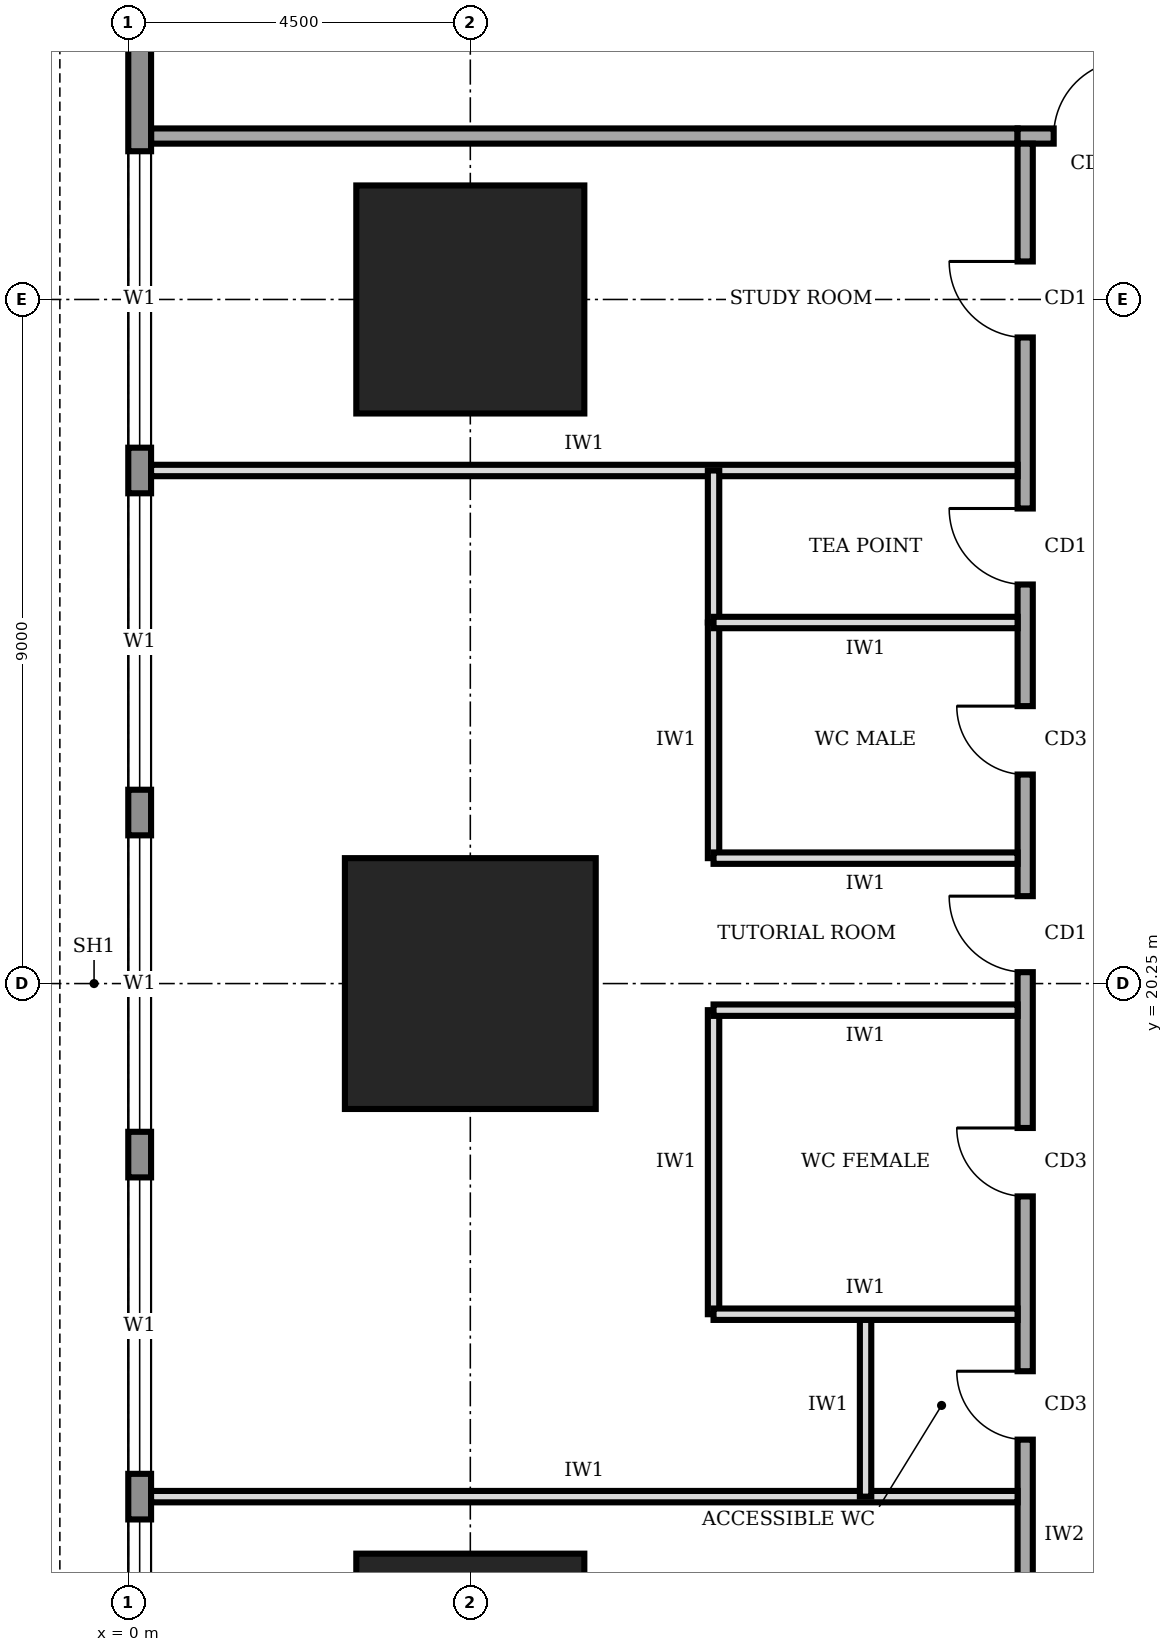
"""IFC4 building model, lengths in metres.
Left out: names, types, materials, properties, quantities, classifications, styles, units other than length and angle.
Written with IfcOpenShell. Run it as: python <this file> out.ifc"""

import sys

from ifc_helpers import new_model, si_unit, direction, frame, frame_2d, origin, origin_2d, place, context, subcontext, project, spatial, rectangle, extrude, element, fill, save


model = new_model("IFC4")
c1 = context("Model", 3, precision=1e-05, world=origin(), true_north=direction((0.0, 1.0)))
c2 = subcontext(c1, "Body", "Model", "MODEL_VIEW")
j1 = project(units=[si_unit("LENGTHUNIT", "METRE"), si_unit("PLANEANGLEUNIT", "RADIAN")], contexts=[c1])
p1 = place(None, origin())
s1 = spatial("IfcSite", under=j1, at=p1, CompositionType="ELEMENT")
p2 = place(p1, origin())
s2 = spatial("IfcBuilding", under=s1, at=p2, CompositionType="ELEMENT")
p3 = place(p2, frame((0.0, 0.0, 41.0)))
s3 = spatial("IfcBuildingStorey", under=s2, at=p3, CompositionType="ELEMENT", Elevation=41.0)
p4 = place(p3, frame((4.5, 11.25, 0.0), z_axis=(0.0, 0.0, 1.0), x_axis=(1.0, 0.0, 0.0)))
e1 = element("IfcColumn", 1, at=p4, inside=s3, PredefinedType="COLUMN", context=c2, shape_type="SweptSolid", body=[
    extrude(rectangle(XDim=3.0, YDim=3.0, at=origin_2d()), origin(), (0.0, 0.0, 1.0), 4.0),
])
p5 = place(p3, frame((4.5, 20.25, 0.0), z_axis=(0.0, 0.0, 1.0), x_axis=(1.0, 0.0, 0.0)))
e2 = element("IfcColumn", 2, at=p5, inside=s3, PredefinedType="COLUMN", context=c2, shape_type="SweptSolid", body=[
    extrude(rectangle(XDim=3.3, YDim=3.3, at=origin_2d()), origin(), (0.0, 0.0, 1.0), 4.0),
])
p6 = place(p3, frame((4.5, 29.25, 0.0), z_axis=(0.0, 0.0, 1.0), x_axis=(1.0, 0.0, 0.0)))
e3 = element("IfcColumn", 3, at=p6, inside=s3, PredefinedType="COLUMN", context=c2, shape_type="SweptSolid", body=[
    extrude(rectangle(XDim=3.0, YDim=3.0, at=origin_2d()), origin(), (0.0, 0.0, 1.0), 4.0),
])
p7 = place(p3, frame((0.15, 35.98, 0.0), z_axis=(0.0, 0.0, 1.0), x_axis=(0.0, -1.0, 0.0)))
e4 = element("IfcWall", 4, at=p7, inside=s3, PredefinedType="STANDARD", context=c2, shape_type="SweptSolid", body=[
    extrude(rectangle(XDim=31.46, YDim=0.3, at=frame_2d((15.73, 0.0))), origin(), (0.0, 0.0, 1.0), 3.75),
])
p8 = place(p7, frame((27.28, 0.0, 0.9)))
e5 = element("IfcOpeningElement", 5, at=p8, cuts=e4, PredefinedType="OPENING", context=c2, shape_type="SweptSolid", body=[
    extrude(rectangle(XDim=3.9, YDim=2.2, at=frame_2d((1.95, 1.1))), frame((0.0, 0.16, 0.0), z_axis=(0.0, -1.0, 0.0), x_axis=(1.0, 0.0, 0.0)), (0.0, 0.0, 1.0), 0.32),
])
p9 = place(p7, frame((22.78, 0.0, 0.9)))
e6 = element("IfcOpeningElement", 6, at=p9, cuts=e4, PredefinedType="OPENING", context=c2, shape_type="SweptSolid", body=[
    extrude(rectangle(XDim=3.9, YDim=2.2, at=frame_2d((1.95, 1.1))), frame((0.0, 0.16, 0.0), z_axis=(0.0, -1.0, 0.0), x_axis=(1.0, 0.0, 0.0)), (0.0, 0.0, 1.0), 0.32),
])
p10 = place(p7, frame((18.28, 0.0, 0.9)))
e7 = element("IfcOpeningElement", 7, at=p10, cuts=e4, PredefinedType="OPENING", context=c2, shape_type="SweptSolid", body=[
    extrude(rectangle(XDim=3.9, YDim=2.2, at=frame_2d((1.95, 1.1))), frame((0.0, 0.16, 0.0), z_axis=(0.0, -1.0, 0.0), x_axis=(1.0, 0.0, 0.0)), (0.0, 0.0, 1.0), 0.32),
])
p11 = place(p7, frame((13.78, 0.0, 0.9)))
e8 = element("IfcOpeningElement", 8, at=p11, cuts=e4, PredefinedType="OPENING", context=c2, shape_type="SweptSolid", body=[
    extrude(rectangle(XDim=3.9, YDim=2.2, at=frame_2d((1.95, 1.1))), frame((0.0, 0.16, 0.0), z_axis=(0.0, -1.0, 0.0), x_axis=(1.0, 0.0, 0.0)), (0.0, 0.0, 1.0), 0.32),
])
p12 = place(p7, frame((9.28, 0.0, 0.9)))
e9 = element("IfcOpeningElement", 9, at=p12, cuts=e4, PredefinedType="OPENING", context=c2, shape_type="SweptSolid", body=[
    extrude(rectangle(XDim=3.9, YDim=2.2, at=frame_2d((1.95, 1.1))), frame((0.0, 0.16, 0.0), z_axis=(0.0, -1.0, 0.0), x_axis=(1.0, 0.0, 0.0)), (0.0, 0.0, 1.0), 0.32),
])
p13 = place(p7, frame((4.78, 0.0, 0.9)))
e10 = element("IfcOpeningElement", 10, at=p13, cuts=e4, PredefinedType="OPENING", context=c2, shape_type="SweptSolid", body=[
    extrude(rectangle(XDim=3.9, YDim=2.2, at=frame_2d((1.95, 1.1))), frame((0.0, 0.16, 0.0), z_axis=(0.0, -1.0, 0.0), x_axis=(1.0, 0.0, 0.0)), (0.0, 0.0, 1.0), 0.32),
])
p14 = place(p3, frame((30.1, 31.4, 0.0), z_axis=(0.0, 0.0, 1.0), x_axis=(-1.0, 0.0, 0.0)))
e11 = element("IfcWall", 11, at=p14, inside=s3, PredefinedType="SOLIDWALL", context=c2, shape_type="SweptSolid", body=[
    extrude(rectangle(XDim=18.4, YDim=0.2, at=frame_2d((9.2, 0.0))), origin(), (0.0, 0.0, 1.0), 3.75),
])
p15 = place(p14, frame((16.925, 0.0, 0.0)))
e12 = element("IfcOpeningElement", 12, at=p15, cuts=e11, PredefinedType="OPENING", context=c2, shape_type="SweptSolid", body=[
    extrude(rectangle(XDim=1.0, YDim=2.1, at=frame_2d((0.5, 1.05))), frame((0.0, 0.11, 0.0), z_axis=(0.0, -1.0, 0.0), x_axis=(1.0, 0.0, 0.0)), (0.0, 0.0, 1.0), 0.22),
])
p16 = place(p14, frame((13.85, 0.0, 0.0)))
e13 = element("IfcOpeningElement", 13, at=p16, cuts=e11, PredefinedType="OPENING", context=c2, shape_type="SweptSolid", body=[
    extrude(rectangle(XDim=1.0, YDim=2.1, at=frame_2d((0.5, 1.05))), frame((0.0, 0.11, 0.0), z_axis=(0.0, -1.0, 0.0), x_axis=(1.0, 0.0, 0.0)), (0.0, 0.0, 1.0), 0.22),
])
p17 = place(p14, frame((7.1, 0.0, 0.0)))
e14 = element("IfcOpeningElement", 14, at=p17, cuts=e11, PredefinedType="OPENING", context=c2, shape_type="SweptSolid", body=[
    extrude(rectangle(XDim=1.0, YDim=2.1, at=frame_2d((0.5, 1.05))), frame((0.0, 0.11, 0.0), z_axis=(0.0, -1.0, 0.0), x_axis=(1.0, 0.0, 0.0)), (0.0, 0.0, 1.0), 0.22),
])
p18 = place(p14, frame((0.55, 0.0, 0.0)))
e15 = element("IfcOpeningElement", 15, at=p18, cuts=e11, PredefinedType="OPENING", context=c2, shape_type="SweptSolid", body=[
    extrude(rectangle(XDim=1.8, YDim=2.1, at=frame_2d((0.9, 1.05))), frame((0.0, 0.11, 0.0), z_axis=(0.0, -1.0, 0.0), x_axis=(1.0, 0.0, 0.0)), (0.0, 0.0, 1.0), 0.22),
])
p19 = place(p3, frame((11.8, 31.3, 0.0), z_axis=(0.0, 0.0, 1.0), x_axis=(0.0, -1.0, 0.0)))
e16 = element("IfcWall", 16, at=p19, inside=s3, PredefinedType="SOLIDWALL", context=c2, shape_type="SweptSolid", body=[
    extrude(rectangle(XDim=22.3, YDim=0.2, at=frame_2d((11.15, 0.0))), origin(), (0.0, 0.0, 1.0), 3.75),
])
p20 = place(p19, frame((19.55, 0.0, 0.0)))
e17 = element("IfcOpeningElement", 17, at=p20, cuts=e16, PredefinedType="OPENING", context=c2, shape_type="SweptSolid", body=[
    extrude(rectangle(XDim=1.0, YDim=2.1, at=frame_2d((0.5, 1.05))), frame((0.0, 0.11, 0.0), z_axis=(0.0, -1.0, 0.0), x_axis=(1.0, 0.0, 0.0)), (0.0, 0.0, 1.0), 0.22),
])
p21 = place(p19, frame((16.15, 0.0, 0.0)))
e18 = element("IfcOpeningElement", 18, at=p21, cuts=e16, PredefinedType="OPENING", context=c2, shape_type="SweptSolid", body=[
    extrude(rectangle(XDim=0.9, YDim=2.1, at=frame_2d((0.45, 1.05))), frame((0.0, 0.11, 0.0), z_axis=(0.0, -1.0, 0.0), x_axis=(1.0, 0.0, 0.0)), (0.0, 0.0, 1.0), 0.22),
])
p22 = place(p19, frame((12.95, 0.0, 0.0)))
e19 = element("IfcOpeningElement", 19, at=p22, cuts=e16, PredefinedType="OPENING", context=c2, shape_type="SweptSolid", body=[
    extrude(rectangle(XDim=0.9, YDim=2.1, at=frame_2d((0.45, 1.05))), frame((0.0, 0.11, 0.0), z_axis=(0.0, -1.0, 0.0), x_axis=(1.0, 0.0, 0.0)), (0.0, 0.0, 1.0), 0.22),
])
p23 = place(p19, frame((7.4, 0.0, 0.0)))
e20 = element("IfcOpeningElement", 20, at=p23, cuts=e16, PredefinedType="OPENING", context=c2, shape_type="SweptSolid", body=[
    extrude(rectangle(XDim=0.9, YDim=2.1, at=frame_2d((0.45, 1.05))), frame((0.0, 0.11, 0.0), z_axis=(0.0, -1.0, 0.0), x_axis=(1.0, 0.0, 0.0)), (0.0, 0.0, 1.0), 0.22),
])
p24 = place(p19, frame((4.8, 0.0, 0.0)))
e21 = element("IfcOpeningElement", 21, at=p24, cuts=e16, PredefinedType="OPENING", context=c2, shape_type="SweptSolid", body=[
    extrude(rectangle(XDim=1.0, YDim=2.1, at=frame_2d((0.5, 1.05))), frame((0.0, 0.11, 0.0), z_axis=(0.0, -1.0, 0.0), x_axis=(1.0, 0.0, 0.0)), (0.0, 0.0, 1.0), 0.22),
])
p25 = place(p19, frame((9.9, 0.0, 0.0)))
e22 = element("IfcOpeningElement", 22, at=p25, cuts=e16, PredefinedType="OPENING", context=c2, shape_type="SweptSolid", body=[
    extrude(rectangle(XDim=1.0, YDim=2.1, at=frame_2d((0.5, 1.05))), frame((0.0, 0.11, 0.0), z_axis=(0.0, -1.0, 0.0), x_axis=(1.0, 0.0, 0.0)), (0.0, 0.0, 1.0), 0.22),
])
p26 = place(p19, frame((1.55, 0.0, 0.0)))
e23 = element("IfcOpeningElement", 23, at=p26, cuts=e16, PredefinedType="OPENING", context=c2, shape_type="SweptSolid", body=[
    extrude(rectangle(XDim=1.0, YDim=2.1, at=frame_2d((0.5, 1.05))), frame((0.0, 0.11, 0.0), z_axis=(0.0, -1.0, 0.0), x_axis=(1.0, 0.0, 0.0)), (0.0, 0.0, 1.0), 0.22),
])
p27 = place(p3, frame((0.3, 31.4, 0.0), z_axis=(0.0, 0.0, 1.0), x_axis=(1.0, 0.0, 0.0)))
e24 = element("IfcWall", 24, at=p27, inside=s3, PredefinedType="SOLIDWALL", context=c2, shape_type="SweptSolid", body=[
    extrude(rectangle(XDim=11.4, YDim=0.2, at=frame_2d((5.7, 0.0))), origin(), (0.0, 0.0, 1.0), 3.75),
])
for number, where, z_axis, x_axis in (
    (25, (0.3, 13.5, 0.0), (0.0, 0.0, 1.0), (1.0, 0.0, 0.0)),
    (26, (0.3, 27.0, 0.0), (0.0, 0.0, 1.0), (1.0, 0.0, 0.0)),
):
    element("IfcWall", number, at=place(p3, frame(where, z_axis=z_axis, x_axis=x_axis)), inside=s3, PredefinedType="PARTITIONING", context=c2, shape_type="SweptSolid", body=[
        extrude(rectangle(XDim=11.4, YDim=0.15, at=frame_2d((5.7, 0.0))), origin(), (0.0, 0.0, 1.0), 3.75),
    ])
p28 = place(p3, frame((11.7, 15.9, 0.0), z_axis=(0.0, 0.0, 1.0), x_axis=(-1.0, 0.0, 0.0)))
e27 = element("IfcWall", 27, at=p28, inside=s3, PredefinedType="PARTITIONING", context=c2, shape_type="SweptSolid", body=[
    extrude(rectangle(XDim=4.0, YDim=0.15, at=frame_2d((2.0, 0.0))), origin(), (0.0, 0.0, 1.0), 3.75),
])
p29 = place(p3, frame((11.7, 19.9, 0.0), z_axis=(0.0, 0.0, 1.0), x_axis=(-1.0, 0.0, 0.0)))
e28 = element("IfcWall", 28, at=p29, inside=s3, PredefinedType="PARTITIONING", context=c2, shape_type="SweptSolid", body=[
    extrude(rectangle(XDim=4.0, YDim=0.15, at=frame_2d((2.0, 0.0))), origin(), (0.0, 0.0, 1.0), 2.85),
])
for number, where, z_axis, x_axis in (
    (29, (11.7, 21.9, 0.0), (0.0, 0.0, 1.0), (-1.0, 0.0, 0.0)),
    (30, (11.7, 25.0, 0.0), (0.0, 0.0, 1.0), (-1.0, 0.0, 0.0)),
):
    element("IfcWall", number, at=place(p3, frame(where, z_axis=z_axis, x_axis=x_axis)), inside=s3, PredefinedType="PARTITIONING", context=c2, shape_type="SweptSolid", body=[
        extrude(rectangle(XDim=4.0, YDim=0.15, at=frame_2d((2.0, 0.0))), origin(), (0.0, 0.0, 1.0), 3.75),
    ])
p30 = place(p3, frame((9.7, 13.5, 0.0), z_axis=(0.0, 0.0, 1.0), x_axis=(0.0, 1.0, 0.0)))
e31 = element("IfcWall", 31, at=p30, inside=s3, PredefinedType="PARTITIONING", context=c2, shape_type="SweptSolid", body=[
    extrude(rectangle(XDim=2.4, YDim=0.15, at=frame_2d((1.2, 0.0))), origin(), (0.0, 0.0, 1.0), 3.75),
])
p31 = place(p3, frame((7.7, 15.9, 0.0), z_axis=(0.0, 0.0, 1.0), x_axis=(0.0, 1.0, 0.0)))
e32 = element("IfcWall", 32, at=p31, inside=s3, PredefinedType="PARTITIONING", context=c2, shape_type="SweptSolid", body=[
    extrude(rectangle(XDim=4.0, YDim=0.15, at=frame_2d((2.0, 0.0))), origin(), (0.0, 0.0, 1.0), 3.75),
])
p32 = place(p3, frame((7.7, 21.9, 0.0), z_axis=(0.0, 0.0, 1.0), x_axis=(0.0, 1.0, 0.0)))
e33 = element("IfcWall", 33, at=p32, inside=s3, PredefinedType="PARTITIONING", context=c2, shape_type="SweptSolid", body=[
    extrude(rectangle(XDim=3.1, YDim=0.15, at=frame_2d((1.55, 0.0))), origin(), (0.0, 0.0, 1.0), 3.75),
])
p33 = place(p3, frame((7.7, 25.0, 0.0), z_axis=(0.0, 0.0, 1.0), x_axis=(0.0, 1.0, 0.0)))
e34 = element("IfcWall", 34, at=p33, inside=s3, PredefinedType="PARTITIONING", context=c2, shape_type="SweptSolid", body=[
    extrude(rectangle(XDim=2.0, YDim=0.15, at=frame_2d((1.0, 0.0))), origin(), (0.0, 0.0, 1.0), 3.75),
])
p34 = place(p9, origin())
e35 = element("IfcWindow", 35, at=p34, inside=s3, PartitioningType="SINGLE_PANEL", PredefinedType="WINDOW", context=c2, shape_type="SweptSolid", body=[
    extrude(rectangle(XDim=3.9, YDim=2.2, at=frame_2d((1.95, 1.1))), frame((0.0, 0.03, 0.0), z_axis=(0.0, -1.0, 0.0), x_axis=(1.0, 0.0, 0.0)), (0.0, 0.0, 1.0), 0.06),
])
fill(e6, e35)
p35 = place(p10, origin())
e36 = element("IfcWindow", 36, at=p35, inside=s3, PartitioningType="SINGLE_PANEL", PredefinedType="WINDOW", context=c2, shape_type="SweptSolid", body=[
    extrude(rectangle(XDim=3.9, YDim=2.2, at=frame_2d((1.95, 1.1))), frame((0.0, 0.03, 0.0), z_axis=(0.0, -1.0, 0.0), x_axis=(1.0, 0.0, 0.0)), (0.0, 0.0, 1.0), 0.06),
])
fill(e7, e36)
p36 = place(p11, origin())
e37 = element("IfcWindow", 37, at=p36, inside=s3, PartitioningType="SINGLE_PANEL", PredefinedType="WINDOW", context=c2, shape_type="SweptSolid", body=[
    extrude(rectangle(XDim=3.9, YDim=2.2, at=frame_2d((1.95, 1.1))), frame((0.0, 0.03, 0.0), z_axis=(0.0, -1.0, 0.0), x_axis=(1.0, 0.0, 0.0)), (0.0, 0.0, 1.0), 0.06),
])
fill(e8, e37)
p37 = place(p12, origin())
e38 = element("IfcWindow", 38, at=p37, inside=s3, PartitioningType="SINGLE_PANEL", PredefinedType="WINDOW", context=c2, shape_type="SweptSolid", body=[
    extrude(rectangle(XDim=3.9, YDim=2.2, at=frame_2d((1.95, 1.1))), frame((0.0, 0.03, 0.0), z_axis=(0.0, -1.0, 0.0), x_axis=(1.0, 0.0, 0.0)), (0.0, 0.0, 1.0), 0.06),
])
fill(e9, e38)
p38 = place(p13, origin())
e39 = element("IfcWindow", 39, at=p38, inside=s3, PartitioningType="SINGLE_PANEL", PredefinedType="WINDOW", context=c2, shape_type="SweptSolid", body=[
    extrude(rectangle(XDim=3.9, YDim=2.2, at=frame_2d((1.95, 1.1))), frame((0.0, 0.03, 0.0), z_axis=(0.0, -1.0, 0.0), x_axis=(1.0, 0.0, 0.0)), (0.0, 0.0, 1.0), 0.06),
])
fill(e10, e39)
p39 = place(p15, frame((1.0, 0.0, 0.0), z_axis=(0.0, 0.0, 1.0), x_axis=(-1.0, 0.0, 0.0)))
e40 = element("IfcDoor", 40, at=p39, inside=s3, OperationType="SINGLE_SWING_RIGHT", PredefinedType="DOOR", context=c2, shape_type="SweptSolid", body=[
    extrude(rectangle(XDim=1.0, YDim=2.1, at=frame_2d((0.5, 1.05))), frame((0.0, 0.025, 0.0), z_axis=(0.0, -1.0, 0.0), x_axis=(1.0, 0.0, 0.0)), (0.0, 0.0, 1.0), 0.05),
])
fill(e12, e40)
p40 = place(p21, frame((0.9, 0.0, 0.0), z_axis=(0.0, 0.0, 1.0), x_axis=(-1.0, 0.0, 0.0)))
e41 = element("IfcDoor", 41, at=p40, inside=s3, OperationType="SINGLE_SWING_RIGHT", PredefinedType="DOOR", context=c2, shape_type="SweptSolid", body=[
    extrude(rectangle(XDim=0.9, YDim=2.1, at=frame_2d((0.45, 1.05))), frame((0.0, 0.025, 0.0), z_axis=(0.0, -1.0, 0.0), x_axis=(1.0, 0.0, 0.0)), (0.0, 0.0, 1.0), 0.05),
])
fill(e18, e41)
p41 = place(p22, frame((0.9, 0.0, 0.0), z_axis=(0.0, 0.0, 1.0), x_axis=(-1.0, 0.0, 0.0)))
e42 = element("IfcDoor", 42, at=p41, inside=s3, OperationType="SINGLE_SWING_RIGHT", PredefinedType="DOOR", context=c2, shape_type="SweptSolid", body=[
    extrude(rectangle(XDim=0.9, YDim=2.1, at=frame_2d((0.45, 1.05))), frame((0.0, 0.025, 0.0), z_axis=(0.0, -1.0, 0.0), x_axis=(1.0, 0.0, 0.0)), (0.0, 0.0, 1.0), 0.05),
])
fill(e19, e42)
p42 = place(p23, frame((0.9, 0.0, 0.0), z_axis=(0.0, 0.0, 1.0), x_axis=(-1.0, 0.0, 0.0)))
e43 = element("IfcDoor", 43, at=p42, inside=s3, OperationType="SINGLE_SWING_RIGHT", PredefinedType="DOOR", context=c2, shape_type="SweptSolid", body=[
    extrude(rectangle(XDim=0.9, YDim=2.1, at=frame_2d((0.45, 1.05))), frame((0.0, 0.025, 0.0), z_axis=(0.0, -1.0, 0.0), x_axis=(1.0, 0.0, 0.0)), (0.0, 0.0, 1.0), 0.05),
])
fill(e20, e43)
p43 = place(p24, frame((1.0, 0.0, 0.0), z_axis=(0.0, 0.0, 1.0), x_axis=(-1.0, 0.0, 0.0)))
e44 = element("IfcDoor", 44, at=p43, inside=s3, OperationType="SINGLE_SWING_RIGHT", PredefinedType="DOOR", context=c2, shape_type="SweptSolid", body=[
    extrude(rectangle(XDim=1.0, YDim=2.1, at=frame_2d((0.5, 1.05))), frame((0.0, 0.025, 0.0), z_axis=(0.0, -1.0, 0.0), x_axis=(1.0, 0.0, 0.0)), (0.0, 0.0, 1.0), 0.05),
])
fill(e21, e44)
p44 = place(p25, frame((1.0, 0.0, 0.0), z_axis=(0.0, 0.0, 1.0), x_axis=(-1.0, 0.0, 0.0)))
e45 = element("IfcDoor", 45, at=p44, inside=s3, OperationType="SINGLE_SWING_RIGHT", PredefinedType="DOOR", context=c2, shape_type="SweptSolid", body=[
    extrude(rectangle(XDim=1.0, YDim=2.1, at=frame_2d((0.5, 1.05))), frame((0.0, 0.025, 0.0), z_axis=(0.0, -1.0, 0.0), x_axis=(1.0, 0.0, 0.0)), (0.0, 0.0, 1.0), 0.05),
])
fill(e22, e45)
p45 = place(p26, frame((1.0, 0.0, 0.0), z_axis=(0.0, 0.0, 1.0), x_axis=(-1.0, 0.0, 0.0)))
e46 = element("IfcDoor", 46, at=p45, inside=s3, OperationType="SINGLE_SWING_RIGHT", PredefinedType="DOOR", context=c2, shape_type="SweptSolid", body=[
    extrude(rectangle(XDim=1.0, YDim=2.1, at=frame_2d((0.5, 1.05))), frame((0.0, 0.025, 0.0), z_axis=(0.0, -1.0, 0.0), x_axis=(1.0, 0.0, 0.0)), (0.0, 0.0, 1.0), 0.05),
])
fill(e23, e46)
save(model, sys.argv[1])
